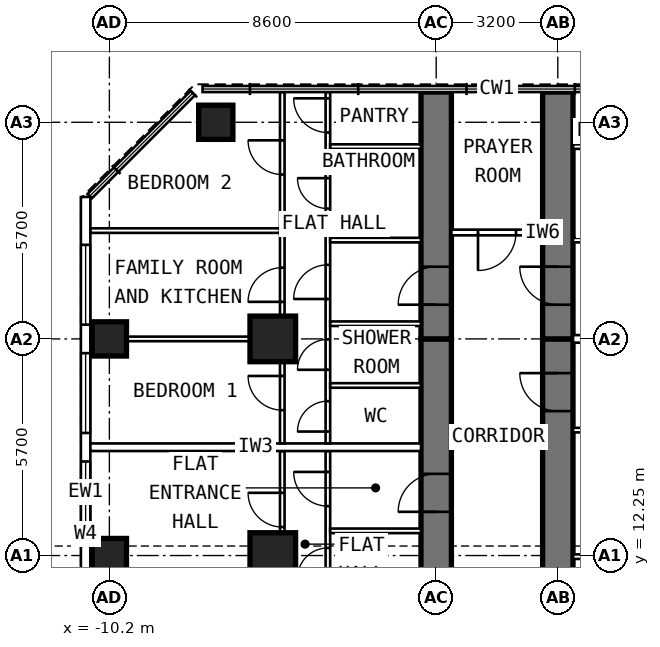
"""IFC4 building model, lengths in metres.
Left out: names, types, materials, properties, quantities, classifications, styles, units other than length and angle.
Written with IfcOpenShell. Run it as: python <this file> out.ifc"""

import sys

from ifc_helpers import new_model, si_unit, direction, frame, frame_2d, origin, origin_2d, place, context, subcontext, project, spatial, rectangle, extrude, element, fill, save


model = new_model("IFC4")
c1 = context("Model", 3, precision=1e-05, world=origin(), true_north=direction((0.0, 1.0)))
c2 = subcontext(c1, "Body", "Model", "MODEL_VIEW")
j1 = project(units=[si_unit("LENGTHUNIT", "METRE"), si_unit("PLANEANGLEUNIT", "RADIAN")], contexts=[c1])
p1 = place(None, origin())
s1 = spatial("IfcSite", under=j1, at=p1, CompositionType="ELEMENT")
p2 = place(p1, origin())
s2 = spatial("IfcBuilding", under=s1, at=p2, CompositionType="ELEMENT")
p3 = place(p2, frame((0.0, 0.0, 158.0)))
s3 = spatial("IfcBuildingStorey", under=s2, at=p3, CompositionType="ELEMENT", Elevation=158.0)
for number, where, z_axis, x_axis in (
    (1, (-10.2, 12.25, 0.0), (0.0, 0.0, 1.0), (0.0, 1.0, 0.0)),
    (2, (-10.2, 17.95, 0.0), (0.0, 0.0, 1.0), (0.0, 1.0, 0.0)),
    (3, (-7.4, 23.65, 0.0), (0.0, 0.0, 1.0), (0.0, 1.0, 0.0)),
):
    element("IfcColumn", number, at=place(p3, frame(where, z_axis=z_axis, x_axis=x_axis)), inside=s3, PredefinedType="COLUMN", context=c2, shape_type="SweptSolid", body=[
        extrude(rectangle(XDim=0.9, YDim=0.9, at=origin_2d()), origin(), (0.0, 0.0, 1.0), 3.6),
    ])
for number, where, z_axis, x_axis in (
    (4, (-5.9, 12.25, 0.0), (0.0, 0.0, 1.0), (0.0, 1.0, 0.0)),
    (5, (-5.9, 17.95, 0.0), (0.0, 0.0, 1.0), (0.0, 1.0, 0.0)),
):
    element("IfcColumn", number, at=place(p3, frame(where, z_axis=z_axis, x_axis=x_axis)), inside=s3, PredefinedType="COLUMN", context=c2, shape_type="SweptSolid", body=[
        extrude(rectangle(XDim=1.2, YDim=1.2, at=origin_2d()), origin(), (0.0, 0.0, 1.0), 3.6),
    ])
p4 = place(p3, frame((-1.6, 9.6, 0.0), z_axis=(0.0, 0.0, 1.0), x_axis=(0.0, 1.0, 0.0)))
e6 = element("IfcWall", 6, at=p4, inside=s3, PredefinedType="SHEAR", context=c2, shape_type="SweptSolid", body=[
    extrude(rectangle(XDim=8.35, YDim=0.8, at=frame_2d((4.175, 0.0))), origin(), (0.0, 0.0, 1.0), 3.6),
])
p5 = place(p4, frame((3.8, 0.0, 0.0)))
e7 = element("IfcOpeningElement", 7, at=p5, cuts=e6, PredefinedType="OPENING", context=c2, shape_type="SweptSolid", body=[
    extrude(rectangle(XDim=1.0, YDim=2.1, at=frame_2d((0.5, 1.05))), frame((0.0, 0.412, 0.0), z_axis=(0.0, -1.0, 0.0), x_axis=(1.0, 0.0, 0.0)), (0.0, 0.0, 1.0), 0.824),
])
p6 = place(p3, frame((-1.6, 17.95, 0.0), z_axis=(0.0, 0.0, 1.0), x_axis=(0.0, 1.0, 0.0)))
e8 = element("IfcWall", 8, at=p6, inside=s3, PredefinedType="SHEAR", context=c2, shape_type="SweptSolid", body=[
    extrude(rectangle(XDim=6.495, YDim=0.8, at=frame_2d((3.248, 0.0))), origin(), (0.0, 0.0, 1.0), 3.6),
])
p7 = place(p6, frame((0.9, 0.0, 0.0)))
e9 = element("IfcOpeningElement", 9, at=p7, cuts=e8, PredefinedType="OPENING", context=c2, shape_type="SweptSolid", body=[
    extrude(rectangle(XDim=1.0, YDim=2.1, at=frame_2d((0.5, 1.05))), frame((0.0, 0.412, 0.0), z_axis=(0.0, -1.0, 0.0), x_axis=(1.0, 0.0, 0.0)), (0.0, 0.0, 1.0), 0.824),
])
p8 = place(p3, frame((1.6, 9.6, 0.0), z_axis=(0.0, 0.0, 1.0), x_axis=(0.0, 1.0, 0.0)))
e10 = element("IfcWall", 10, at=p8, inside=s3, PredefinedType="SHEAR", context=c2, shape_type="SweptSolid", body=[
    extrude(rectangle(XDim=8.35, YDim=0.8, at=frame_2d((4.175, 0.0))), origin(), (0.0, 0.0, 1.0), 3.6),
])
p9 = place(p8, frame((6.45, 0.0, 0.0)))
e11 = element("IfcOpeningElement", 11, at=p9, cuts=e10, PredefinedType="OPENING", context=c2, shape_type="SweptSolid", body=[
    extrude(rectangle(XDim=1.0, YDim=2.1, at=frame_2d((0.5, 1.05))), frame((0.0, 0.412, 0.0), z_axis=(0.0, -1.0, 0.0), x_axis=(1.0, 0.0, 0.0)), (0.0, 0.0, 1.0), 0.824),
])
p10 = place(p3, frame((1.6, 17.95, 0.0), z_axis=(0.0, 0.0, 1.0), x_axis=(0.0, 1.0, 0.0)))
e12 = element("IfcWall", 12, at=p10, inside=s3, PredefinedType="SHEAR", context=c2, shape_type="SweptSolid", body=[
    extrude(rectangle(XDim=6.495, YDim=0.8, at=frame_2d((3.248, 0.0))), origin(), (0.0, 0.0, 1.0), 3.6),
])
p11 = place(p10, frame((0.9, 0.0, 0.0)))
e13 = element("IfcOpeningElement", 13, at=p11, cuts=e12, PredefinedType="OPENING", context=c2, shape_type="SweptSolid", body=[
    extrude(rectangle(XDim=1.0, YDim=2.1, at=frame_2d((0.5, 1.05))), frame((0.0, 0.412, 0.0), z_axis=(0.0, -1.0, 0.0), x_axis=(1.0, 0.0, 0.0)), (0.0, 0.0, 1.0), 0.824),
])
p12 = place(p3, frame((-10.825, 6.148, 0.0), z_axis=(0.0, 0.0, 1.0), x_axis=(0.0, 1.0, 0.0)))
e14 = element("IfcWall", 14, at=p12, inside=s3, PredefinedType="SOLIDWALL", context=c2, shape_type="SweptSolid", body=[
    extrude(rectangle(XDim=15.537, YDim=0.25, at=frame_2d((7.769, 0.0))), origin(), (0.0, 0.0, 1.0), 3.35),
])
p13 = place(p12, frame((0.777, 0.0, 0.8)))
e15 = element("IfcOpeningElement", 15, at=p13, cuts=e14, PredefinedType="OPENING", context=c2, shape_type="SweptSolid", body=[
    extrude(rectangle(XDim=2.1, YDim=1.8, at=frame_2d((1.05, 0.9))), frame((0.0, 0.137, 0.0), z_axis=(0.0, -1.0, 0.0), x_axis=(1.0, 0.0, 0.0)), (0.0, 0.0, 1.0), 0.274),
])
p14 = place(p12, frame((3.627, 0.0, 0.8)))
e16 = element("IfcOpeningElement", 16, at=p14, cuts=e14, PredefinedType="OPENING", context=c2, shape_type="SweptSolid", body=[
    extrude(rectangle(XDim=2.1, YDim=1.8, at=frame_2d((1.05, 0.9))), frame((0.0, 0.137, 0.0), z_axis=(0.0, -1.0, 0.0), x_axis=(1.0, 0.0, 0.0)), (0.0, 0.0, 1.0), 0.274),
])
p15 = place(p12, frame((6.477, 0.0, 0.8)))
e17 = element("IfcOpeningElement", 17, at=p15, cuts=e14, PredefinedType="OPENING", context=c2, shape_type="SweptSolid", body=[
    extrude(rectangle(XDim=2.1, YDim=1.8, at=frame_2d((1.05, 0.9))), frame((0.0, 0.137, 0.0), z_axis=(0.0, -1.0, 0.0), x_axis=(1.0, 0.0, 0.0)), (0.0, 0.0, 1.0), 0.274),
])
p16 = place(p12, frame((9.327, 0.0, 0.8)))
e18 = element("IfcOpeningElement", 18, at=p16, cuts=e14, PredefinedType="OPENING", context=c2, shape_type="SweptSolid", body=[
    extrude(rectangle(XDim=2.1, YDim=1.8, at=frame_2d((1.05, 0.9))), frame((0.0, 0.137, 0.0), z_axis=(0.0, -1.0, 0.0), x_axis=(1.0, 0.0, 0.0)), (0.0, 0.0, 1.0), 0.274),
])
p17 = place(p12, frame((12.177, 0.0, 0.8)))
e19 = element("IfcOpeningElement", 19, at=p17, cuts=e14, PredefinedType="OPENING", context=c2, shape_type="SweptSolid", body=[
    extrude(rectangle(XDim=2.1, YDim=1.8, at=frame_2d((1.05, 0.9))), frame((0.0, 0.137, 0.0), z_axis=(0.0, -1.0, 0.0), x_axis=(1.0, 0.0, 0.0)), (0.0, 0.0, 1.0), 0.274),
])
p18 = place(p3, frame((-4.45, 10.05, 0.0), z_axis=(0.0, 0.0, 1.0), x_axis=(0.0, 1.0, 0.0)))
e20 = element("IfcWall", 20, at=p18, inside=s3, PredefinedType="PARTITIONING", context=c2, shape_type="SweptSolid", body=[
    extrude(rectangle(XDim=4.95, YDim=0.12, at=frame_2d((2.475, 0.0))), origin(), (0.0, 0.0, 1.0), 3.35),
])
p19 = place(p18, frame((1.6, 0.0, 0.0)))
e21 = element("IfcOpeningElement", 21, at=p19, cuts=e20, PredefinedType="OPENING", context=c2, shape_type="SweptSolid", body=[
    extrude(rectangle(XDim=0.8, YDim=2.1, at=frame_2d((0.4, 1.05))), frame((0.0, 0.072, 0.0), z_axis=(0.0, -1.0, 0.0), x_axis=(1.0, 0.0, 0.0)), (0.0, 0.0, 1.0), 0.144),
])
p20 = place(p18, frame((3.5, 0.0, 0.0)))
e22 = element("IfcOpeningElement", 22, at=p20, cuts=e20, PredefinedType="OPENING", context=c2, shape_type="SweptSolid", body=[
    extrude(rectangle(XDim=0.9, YDim=2.1, at=frame_2d((0.45, 1.05))), frame((0.0, 0.072, 0.0), z_axis=(0.0, -1.0, 0.0), x_axis=(1.0, 0.0, 0.0)), (0.0, 0.0, 1.0), 0.144),
])
p21 = place(p3, frame((-5.65, 9.6, 0.0), z_axis=(0.0, 0.0, 1.0), x_axis=(0.0, 1.0, 0.0)))
e23 = element("IfcWall", 23, at=p21, inside=s3, PredefinedType="PARTITIONING", context=c2, shape_type="SweptSolid", body=[
    extrude(rectangle(XDim=5.4, YDim=0.12, at=frame_2d((2.7, 0.0))), origin(), (0.0, 0.0, 1.0), 3.35),
])
p22 = place(p21, frame((3.4, 0.0, 0.0)))
e24 = element("IfcOpeningElement", 24, at=p22, cuts=e23, PredefinedType="OPENING", context=c2, shape_type="SweptSolid", body=[
    extrude(rectangle(XDim=0.9, YDim=2.1, at=frame_2d((0.45, 1.05))), frame((0.0, 0.072, 0.0), z_axis=(0.0, -1.0, 0.0), x_axis=(1.0, 0.0, 0.0)), (0.0, 0.0, 1.0), 0.144),
])
p23 = place(p3, frame((-2.0, 12.9, 0.0), z_axis=(0.0, 0.0, 1.0), x_axis=(-1.0, 0.0, 0.0)))
e25 = element("IfcWall", 25, at=p23, inside=s3, PredefinedType="PARTITIONING", context=c2, shape_type="SweptSolid", body=[
    extrude(rectangle(XDim=2.39, YDim=0.12, at=frame_2d((1.195, 0.0))), origin(), (0.0, 0.0, 1.0), 3.35),
])
p24 = place(p3, frame((-4.45, 15.2, 0.0), z_axis=(0.0, 0.0, 1.0), x_axis=(0.0, 1.0, 0.0)))
e26 = element("IfcWall", 26, at=p24, inside=s3, PredefinedType="PARTITIONING", context=c2, shape_type="SweptSolid", body=[
    extrude(rectangle(XDim=9.245, YDim=0.12, at=frame_2d((4.623, 0.0))), origin(), (0.0, 0.0, 1.0), 3.35),
])
p25 = place(p24, frame((0.312, 0.0, 0.0)))
e27 = element("IfcOpeningElement", 27, at=p25, cuts=e26, PredefinedType="OPENING", context=c2, shape_type="SweptSolid", body=[
    extrude(rectangle(XDim=0.8, YDim=2.1, at=frame_2d((0.4, 1.05))), frame((0.0, 0.072, 0.0), z_axis=(0.0, -1.0, 0.0), x_axis=(1.0, 0.0, 0.0)), (0.0, 0.0, 1.0), 0.144),
])
p26 = place(p24, frame((1.938, 0.0, 0.0)))
e28 = element("IfcOpeningElement", 28, at=p26, cuts=e26, PredefinedType="OPENING", context=c2, shape_type="SweptSolid", body=[
    extrude(rectangle(XDim=0.8, YDim=2.1, at=frame_2d((0.4, 1.05))), frame((0.0, 0.072, 0.0), z_axis=(0.0, -1.0, 0.0), x_axis=(1.0, 0.0, 0.0)), (0.0, 0.0, 1.0), 0.144),
])
p27 = place(p24, frame((3.8, 0.0, 0.0)))
e29 = element("IfcOpeningElement", 29, at=p27, cuts=e26, PredefinedType="OPENING", context=c2, shape_type="SweptSolid", body=[
    extrude(rectangle(XDim=0.9, YDim=2.1, at=frame_2d((0.45, 1.05))), frame((0.0, 0.072, 0.0), z_axis=(0.0, -1.0, 0.0), x_axis=(1.0, 0.0, 0.0)), (0.0, 0.0, 1.0), 0.144),
])
p28 = place(p24, frame((6.18, 0.0, 0.0)))
e30 = element("IfcOpeningElement", 30, at=p28, cuts=e26, PredefinedType="OPENING", context=c2, shape_type="SweptSolid", body=[
    extrude(rectangle(XDim=0.8, YDim=2.1, at=frame_2d((0.4, 1.05))), frame((0.0, 0.072, 0.0), z_axis=(0.0, -1.0, 0.0), x_axis=(1.0, 0.0, 0.0)), (0.0, 0.0, 1.0), 0.144),
])
p29 = place(p24, frame((8.18, 0.0, 0.0)))
e31 = element("IfcOpeningElement", 31, at=p29, cuts=e26, PredefinedType="OPENING", context=c2, shape_type="SweptSolid", body=[
    extrude(rectangle(XDim=0.9, YDim=2.1, at=frame_2d((0.45, 1.05))), frame((0.0, 0.072, 0.0), z_axis=(0.0, -1.0, 0.0), x_axis=(1.0, 0.0, 0.0)), (0.0, 0.0, 1.0), 0.144),
])
p30 = place(p3, frame((-5.65, 15.2, 0.0), z_axis=(0.0, 0.0, 1.0), x_axis=(0.0, 1.0, 0.0)))
e32 = element("IfcWall", 32, at=p30, inside=s3, PredefinedType="PARTITIONING", context=c2, shape_type="SweptSolid", body=[
    extrude(rectangle(XDim=9.245, YDim=0.12, at=frame_2d((4.623, 0.0))), origin(), (0.0, 0.0, 1.0), 3.35),
])
p31 = place(p30, frame((0.875, 0.0, 0.0)))
e33 = element("IfcOpeningElement", 33, at=p31, cuts=e32, PredefinedType="OPENING", context=c2, shape_type="SweptSolid", body=[
    extrude(rectangle(XDim=0.9, YDim=2.1, at=frame_2d((0.45, 1.05))), frame((0.0, 0.072, 0.0), z_axis=(0.0, -1.0, 0.0), x_axis=(1.0, 0.0, 0.0)), (0.0, 0.0, 1.0), 0.144),
])
p32 = place(p30, frame((3.725, 0.0, 0.0)))
e34 = element("IfcOpeningElement", 34, at=p32, cuts=e32, PredefinedType="OPENING", context=c2, shape_type="SweptSolid", body=[
    extrude(rectangle(XDim=0.9, YDim=2.1, at=frame_2d((0.45, 1.05))), frame((0.0, 0.072, 0.0), z_axis=(0.0, -1.0, 0.0), x_axis=(1.0, 0.0, 0.0)), (0.0, 0.0, 1.0), 0.144),
])
p33 = place(p30, frame((7.075, 0.0, 0.0)))
e35 = element("IfcOpeningElement", 35, at=p33, cuts=e32, PredefinedType="OPENING", context=c2, shape_type="SweptSolid", body=[
    extrude(rectangle(XDim=0.9, YDim=2.1, at=frame_2d((0.45, 1.05))), frame((0.0, 0.072, 0.0), z_axis=(0.0, -1.0, 0.0), x_axis=(1.0, 0.0, 0.0)), (0.0, 0.0, 1.0), 0.144),
])
p34 = place(p3, frame((-5.71, 17.95, 0.0), z_axis=(0.0, 0.0, 1.0), x_axis=(-1.0, 0.0, 0.0)))
e36 = element("IfcWall", 36, at=p34, inside=s3, PredefinedType="PARTITIONING", context=c2, shape_type="SweptSolid", body=[
    extrude(rectangle(XDim=4.99, YDim=0.12, at=frame_2d((2.495, 0.0))), origin(), (0.0, 0.0, 1.0), 2.45),
])
p35 = place(p3, frame((-5.71, 20.8, 0.0), z_axis=(0.0, 0.0, 1.0), x_axis=(-1.0, 0.0, 0.0)))
e37 = element("IfcWall", 37, at=p35, inside=s3, PredefinedType="PARTITIONING", context=c2, shape_type="SweptSolid", body=[
    extrude(rectangle(XDim=4.99, YDim=0.12, at=frame_2d((2.495, 0.0))), origin(), (0.0, 0.0, 1.0), 3.35),
])
for number, where, z_axis, x_axis in (
    (38, (-2.0, 16.725, 0.0), (0.0, 0.0, 1.0), (-1.0, 0.0, 0.0)),
    (39, (-2.0, 18.35, 0.0), (0.0, 0.0, 1.0), (-1.0, 0.0, 0.0)),
    (40, (-2.0, 20.55, 0.0), (0.0, 0.0, 1.0), (-1.0, 0.0, 0.0)),
    (41, (-2.0, 23.01, 0.0), (0.0, 0.0, 1.0), (-1.0, 0.0, 0.0)),
):
    element("IfcWall", number, at=place(p3, frame(where, z_axis=z_axis, x_axis=x_axis)), inside=s3, PredefinedType="PARTITIONING", context=c2, shape_type="SweptSolid", body=[
        extrude(rectangle(XDim=2.39, YDim=0.12, at=frame_2d((1.195, 0.0))), origin(), (0.0, 0.0, 1.0), 3.35),
    ])
p36 = place(p3, frame((-2.0, 15.1, 0.0), z_axis=(0.0, 0.0, 1.0), x_axis=(-1.0, 0.0, 0.0)))
e42 = element("IfcWall", 42, at=p36, inside=s3, PredefinedType="PARTITIONING", context=c2, shape_type="SweptSolid", body=[
    extrude(rectangle(XDim=8.7, YDim=0.2, at=frame_2d((4.35, 0.0))), origin(), (0.0, 0.0, 1.0), 3.35),
])
p37 = place(p3, frame((2.0, 12.22, 0.0), z_axis=(0.0, 0.0, 1.0), x_axis=(1.0, 0.0, 0.0)))
e43 = element("IfcWall", 43, at=p37, inside=s3, PredefinedType="PARTITIONING", context=c2, shape_type="SweptSolid", body=[
    extrude(rectangle(XDim=2.39, YDim=0.12, at=frame_2d((1.195, 0.0))), origin(), (0.0, 0.0, 1.0), 2.45),
])
for number, where, z_axis, x_axis in (
    (44, (2.0, 15.55, 0.0), (0.0, 0.0, 1.0), (1.0, 0.0, 0.0)),
    (45, (2.0, 20.55, 0.0), (0.0, 0.0, 1.0), (1.0, 0.0, 0.0)),
    (46, (2.0, 23.01, 0.0), (0.0, 0.0, 1.0), (1.0, 0.0, 0.0)),
):
    element("IfcWall", number, at=place(p3, frame(where, z_axis=z_axis, x_axis=x_axis)), inside=s3, PredefinedType="PARTITIONING", context=c2, shape_type="SweptSolid", body=[
        extrude(rectangle(XDim=2.39, YDim=0.12, at=frame_2d((1.195, 0.0))), origin(), (0.0, 0.0, 1.0), 3.35),
    ])
p38 = place(p3, frame((2.0, 17.95, 0.0), z_axis=(0.0, 0.0, 1.0), x_axis=(1.0, 0.0, 0.0)))
e47 = element("IfcWall", 47, at=p38, inside=s3, PredefinedType="PARTITIONING", context=c2, shape_type="SweptSolid", body=[
    extrude(rectangle(XDim=8.7, YDim=0.2, at=frame_2d((4.35, 0.0))), origin(), (0.0, 0.0, 1.0), 2.45),
])
p39 = place(p3, frame((1.2, 20.75, 0.0), z_axis=(0.0, 0.0, 1.0), x_axis=(-1.0, 0.0, 0.0)))
e48 = element("IfcWall", 48, at=p39, inside=s3, PredefinedType="PARTITIONING", context=c2, shape_type="SweptSolid", body=[
    extrude(rectangle(XDim=2.4, YDim=0.15, at=frame_2d((1.2, 0.0))), origin(), (0.0, 0.0, 1.0), 3.35),
])
p40 = place(p39, frame((0.7, 0.0, 0.0)))
e49 = element("IfcOpeningElement", 49, at=p40, cuts=e48, PredefinedType="OPENING", context=c2, shape_type="SweptSolid", body=[
    extrude(rectangle(XDim=1.0, YDim=2.1, at=frame_2d((0.5, 1.05))), frame((0.0, 0.087, 0.0), z_axis=(0.0, -1.0, 0.0), x_axis=(1.0, 0.0, 0.0)), (0.0, 0.0, 1.0), 0.174),
])
p41 = place(p15, origin())
e50 = element("IfcWindow", 50, at=p41, inside=s3, PartitioningType="SINGLE_PANEL", PredefinedType="WINDOW", context=c2, shape_type="SweptSolid", body=[
    extrude(rectangle(XDim=2.1, YDim=1.8, at=frame_2d((1.05, 0.9))), frame((0.0, 0.03, 0.0), z_axis=(0.0, -1.0, 0.0), x_axis=(1.0, 0.0, 0.0)), (0.0, 0.0, 1.0), 0.06),
])
fill(e17, e50)
p42 = place(p16, origin())
e51 = element("IfcWindow", 51, at=p42, inside=s3, PartitioningType="SINGLE_PANEL", PredefinedType="WINDOW", context=c2, shape_type="SweptSolid", body=[
    extrude(rectangle(XDim=2.1, YDim=1.8, at=frame_2d((1.05, 0.9))), frame((0.0, 0.03, 0.0), z_axis=(0.0, -1.0, 0.0), x_axis=(1.0, 0.0, 0.0)), (0.0, 0.0, 1.0), 0.06),
])
fill(e18, e51)
p43 = place(p17, origin())
e52 = element("IfcWindow", 52, at=p43, inside=s3, PartitioningType="SINGLE_PANEL", PredefinedType="WINDOW", context=c2, shape_type="SweptSolid", body=[
    extrude(rectangle(XDim=2.1, YDim=1.8, at=frame_2d((1.05, 0.9))), frame((0.0, 0.03, 0.0), z_axis=(0.0, -1.0, 0.0), x_axis=(1.0, 0.0, 0.0)), (0.0, 0.0, 1.0), 0.06),
])
fill(e19, e52)
p44 = place(p5, origin())
e53 = element("IfcDoor", 53, at=p44, inside=s3, OperationType="SINGLE_SWING_LEFT", PredefinedType="DOOR", context=c2, shape_type="SweptSolid", body=[
    extrude(rectangle(XDim=1.0, YDim=2.1, at=frame_2d((0.5, 1.05))), frame((0.0, 0.15, 0.0), z_axis=(0.0, -1.0, 0.0), x_axis=(1.0, 0.0, 0.0)), (0.0, 0.0, 1.0), 0.3),
])
fill(e7, e53)
p45 = place(p22, origin())
e54 = element("IfcDoor", 54, at=p45, inside=s3, OperationType="SINGLE_SWING_RIGHT", PredefinedType="DOOR", context=c2, shape_type="SweptSolid", body=[
    extrude(rectangle(XDim=0.9, YDim=2.1, at=frame_2d((0.45, 1.05))), frame((0.0, 0.025, 0.0), z_axis=(0.0, -1.0, 0.0), x_axis=(1.0, 0.0, 0.0)), (0.0, 0.0, 1.0), 0.05),
])
fill(e24, e54)
p46 = place(p19, origin())
e55 = element("IfcDoor", 55, at=p46, inside=s3, OperationType="SINGLE_SWING_LEFT", PredefinedType="DOOR", context=c2, shape_type="SweptSolid", body=[
    extrude(rectangle(XDim=0.8, YDim=2.1, at=frame_2d((0.4, 1.05))), frame((0.0, 0.025, 0.0), z_axis=(0.0, -1.0, 0.0), x_axis=(1.0, 0.0, 0.0)), (0.0, 0.0, 1.0), 0.05),
])
fill(e21, e55)
p47 = place(p20, origin())
e56 = element("IfcDoor", 56, at=p47, inside=s3, OperationType="SINGLE_SWING_RIGHT", PredefinedType="DOOR", context=c2, shape_type="SweptSolid", body=[
    extrude(rectangle(XDim=0.9, YDim=2.1, at=frame_2d((0.45, 1.05))), frame((0.0, 0.025, 0.0), z_axis=(0.0, -1.0, 0.0), x_axis=(1.0, 0.0, 0.0)), (0.0, 0.0, 1.0), 0.05),
])
fill(e22, e56)
p48 = place(p7, origin())
e57 = element("IfcDoor", 57, at=p48, inside=s3, OperationType="SINGLE_SWING_LEFT", PredefinedType="DOOR", context=c2, shape_type="SweptSolid", body=[
    extrude(rectangle(XDim=1.0, YDim=2.1, at=frame_2d((0.5, 1.05))), frame((0.0, 0.15, 0.0), z_axis=(0.0, -1.0, 0.0), x_axis=(1.0, 0.0, 0.0)), (0.0, 0.0, 1.0), 0.3),
])
fill(e9, e57)
p49 = place(p31, origin())
e58 = element("IfcDoor", 58, at=p49, inside=s3, OperationType="SINGLE_SWING_RIGHT", PredefinedType="DOOR", context=c2, shape_type="SweptSolid", body=[
    extrude(rectangle(XDim=0.9, YDim=2.1, at=frame_2d((0.45, 1.05))), frame((0.0, 0.025, 0.0), z_axis=(0.0, -1.0, 0.0), x_axis=(1.0, 0.0, 0.0)), (0.0, 0.0, 1.0), 0.05),
])
fill(e33, e58)
p50 = place(p32, origin())
e59 = element("IfcDoor", 59, at=p50, inside=s3, OperationType="SINGLE_SWING_LEFT", PredefinedType="DOOR", context=c2, shape_type="SweptSolid", body=[
    extrude(rectangle(XDim=0.9, YDim=2.1, at=frame_2d((0.45, 1.05))), frame((0.0, 0.025, 0.0), z_axis=(0.0, -1.0, 0.0), x_axis=(1.0, 0.0, 0.0)), (0.0, 0.0, 1.0), 0.05),
])
fill(e34, e59)
p51 = place(p33, origin())
e60 = element("IfcDoor", 60, at=p51, inside=s3, OperationType="SINGLE_SWING_RIGHT", PredefinedType="DOOR", context=c2, shape_type="SweptSolid", body=[
    extrude(rectangle(XDim=0.9, YDim=2.1, at=frame_2d((0.45, 1.05))), frame((0.0, 0.025, 0.0), z_axis=(0.0, -1.0, 0.0), x_axis=(1.0, 0.0, 0.0)), (0.0, 0.0, 1.0), 0.05),
])
fill(e35, e60)
p52 = place(p25, origin())
e61 = element("IfcDoor", 61, at=p52, inside=s3, OperationType="SINGLE_SWING_LEFT", PredefinedType="DOOR", context=c2, shape_type="SweptSolid", body=[
    extrude(rectangle(XDim=0.8, YDim=2.1, at=frame_2d((0.4, 1.05))), frame((0.0, 0.025, 0.0), z_axis=(0.0, -1.0, 0.0), x_axis=(1.0, 0.0, 0.0)), (0.0, 0.0, 1.0), 0.05),
])
fill(e27, e61)
p53 = place(p26, origin())
e62 = element("IfcDoor", 62, at=p53, inside=s3, OperationType="SINGLE_SWING_LEFT", PredefinedType="DOOR", context=c2, shape_type="SweptSolid", body=[
    extrude(rectangle(XDim=0.8, YDim=2.1, at=frame_2d((0.4, 1.05))), frame((0.0, 0.025, 0.0), z_axis=(0.0, -1.0, 0.0), x_axis=(1.0, 0.0, 0.0)), (0.0, 0.0, 1.0), 0.05),
])
fill(e28, e62)
p54 = place(p27, origin())
e63 = element("IfcDoor", 63, at=p54, inside=s3, OperationType="SINGLE_SWING_LEFT", PredefinedType="DOOR", context=c2, shape_type="SweptSolid", body=[
    extrude(rectangle(XDim=0.9, YDim=2.1, at=frame_2d((0.45, 1.05))), frame((0.0, 0.025, 0.0), z_axis=(0.0, -1.0, 0.0), x_axis=(1.0, 0.0, 0.0)), (0.0, 0.0, 1.0), 0.05),
])
fill(e29, e63)
p55 = place(p28, origin())
e64 = element("IfcDoor", 64, at=p55, inside=s3, OperationType="SINGLE_SWING_RIGHT", PredefinedType="DOOR", context=c2, shape_type="SweptSolid", body=[
    extrude(rectangle(XDim=0.8, YDim=2.1, at=frame_2d((0.4, 1.05))), frame((0.0, 0.025, 0.0), z_axis=(0.0, -1.0, 0.0), x_axis=(1.0, 0.0, 0.0)), (0.0, 0.0, 1.0), 0.05),
])
fill(e30, e64)
p56 = place(p29, origin())
e65 = element("IfcDoor", 65, at=p56, inside=s3, OperationType="SINGLE_SWING_RIGHT", PredefinedType="DOOR", context=c2, shape_type="SweptSolid", body=[
    extrude(rectangle(XDim=0.9, YDim=2.1, at=frame_2d((0.45, 1.05))), frame((0.0, 0.025, 0.0), z_axis=(0.0, -1.0, 0.0), x_axis=(1.0, 0.0, 0.0)), (0.0, 0.0, 1.0), 0.05),
])
fill(e31, e65)
p57 = place(p9, origin())
e66 = element("IfcDoor", 66, at=p57, inside=s3, OperationType="SINGLE_SWING_RIGHT", PredefinedType="DOOR", context=c2, shape_type="SweptSolid", body=[
    extrude(rectangle(XDim=1.0, YDim=2.1, at=frame_2d((0.5, 1.05))), frame((0.0, 0.15, 0.0), z_axis=(0.0, -1.0, 0.0), x_axis=(1.0, 0.0, 0.0)), (0.0, 0.0, 1.0), 0.3),
])
fill(e11, e66)
p58 = place(p11, origin())
e67 = element("IfcDoor", 67, at=p58, inside=s3, OperationType="SINGLE_SWING_RIGHT", PredefinedType="DOOR", context=c2, shape_type="SweptSolid", body=[
    extrude(rectangle(XDim=1.0, YDim=2.1, at=frame_2d((0.5, 1.05))), frame((0.0, 0.15, 0.0), z_axis=(0.0, -1.0, 0.0), x_axis=(1.0, 0.0, 0.0)), (0.0, 0.0, 1.0), 0.3),
])
fill(e13, e67)
p59 = place(p40, origin())
e68 = element("IfcDoor", 68, at=p59, inside=s3, OperationType="SINGLE_SWING_RIGHT", PredefinedType="DOOR", context=c2, shape_type="SweptSolid", body=[
    extrude(rectangle(XDim=1.0, YDim=2.1, at=frame_2d((0.5, 1.05))), frame((0.0, 0.025, 0.0), z_axis=(0.0, -1.0, 0.0), x_axis=(1.0, 0.0, 0.0)), (0.0, 0.0, 1.0), 0.05),
])
fill(e49, e68)
save(model, sys.argv[1])
